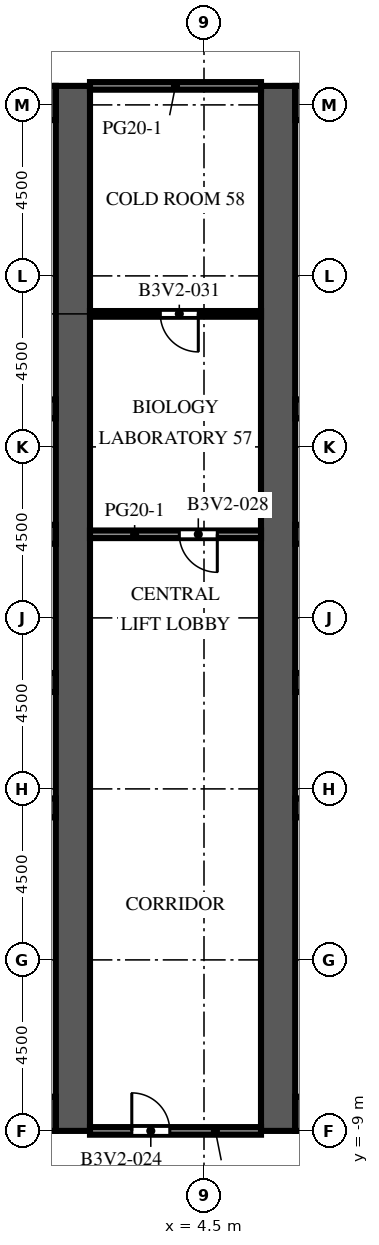
"""IFC4 building model, lengths in metres.
Left out: names, types, materials, properties, quantities, classifications, styles, units other than length and angle.
Written with IfcOpenShell. Run it as: python <this file> out.ifc"""

import sys

from ifc_helpers import new_model, si_unit, direction, frame, frame_2d, origin, place, context, subcontext, project, spatial, rectangle, extrude, element, fill, save


model = new_model("IFC4")
c1 = context("Model", 3, precision=1e-05, world=origin(), true_north=direction((0.0, 1.0)))
c2 = subcontext(c1, "Body", "Model", "MODEL_VIEW")
j1 = project(units=[si_unit("LENGTHUNIT", "METRE"), si_unit("PLANEANGLEUNIT", "RADIAN")], contexts=[c1])
p1 = place(None, origin())
s1 = spatial("IfcSite", under=j1, at=p1, CompositionType="ELEMENT")
p2 = place(p1, origin())
s2 = spatial("IfcBuilding", under=s1, at=p2, CompositionType="ELEMENT")
p3 = place(p2, frame((0.0, 0.0, 98.4)))
s3 = spatial("IfcBuildingStorey", under=s2, at=p3, CompositionType="ELEMENT", Elevation=98.4)
p4 = place(p3, frame((1.05, -9.0, 0.0), z_axis=(0.0, 0.0, 1.0), x_axis=(0.0, 1.0, 0.0)))
e1 = element("IfcWall", 1, at=p4, inside=s3, PredefinedType="SHEAR", context=c2, shape_type="SweptSolid", body=[
    extrude(rectangle(XDim=27.5, YDim=0.9, at=frame_2d((13.75, 0.0))), origin(), (0.0, 0.0, 1.0), 4.1),
])
p5 = place(p4, frame((12.55, 0.0, 0.0)))
e2 = element("IfcOpeningElement", 2, at=p5, cuts=e1, PredefinedType="OPENING", context=c2, shape_type="SweptSolid", body=[
    extrude(rectangle(XDim=2.4, YDim=2.4, at=frame_2d((1.2, 1.2))), frame((0.0, 0.46, 0.0), z_axis=(0.0, -1.0, 0.0), x_axis=(1.0, 0.0, 0.0)), (0.0, 0.0, 1.0), 0.92),
])
p6 = place(p4, frame((3.893, 0.0, 0.0)))
e3 = element("IfcOpeningElement", 3, at=p6, cuts=e1, PredefinedType="OPENING", context=c2, shape_type="SweptSolid", body=[
    extrude(rectangle(XDim=0.923, YDim=2.1, at=frame_2d((0.461, 1.05))), frame((0.0, 0.46, 0.0), z_axis=(0.0, -1.0, 0.0), x_axis=(1.0, 0.0, 0.0)), (0.0, 0.0, 1.0), 0.92),
])
p7 = place(p4, frame((23.427, 0.0, 0.0)))
e4 = element("IfcOpeningElement", 4, at=p7, cuts=e1, PredefinedType="OPENING", context=c2, shape_type="SweptSolid", body=[
    extrude(rectangle(XDim=1.2, YDim=2.1, at=frame_2d((0.6, 1.05))), frame((0.0, 0.46, 0.0), z_axis=(0.0, -1.0, 0.0), x_axis=(1.0, 0.0, 0.0)), (0.0, 0.0, 1.0), 0.92),
])
for number, where, z_axis, x_axis in (
    (5, (-9.6, -8.55, 0.0), (0.0, 0.0, 1.0), (1.0, 0.0, 0.0)),
    (6, (-9.6, 18.05, 0.0), (0.0, 0.0, 1.0), (1.0, 0.0, 0.0)),
):
    element("IfcWall", number, at=place(p3, frame(where, z_axis=z_axis, x_axis=x_axis)), inside=s3, PredefinedType="SHEAR", context=c2, shape_type="SweptSolid", body=[
        extrude(rectangle(XDim=10.2, YDim=0.9, at=frame_2d((5.1, 0.0))), origin(), (0.0, 0.0, 1.0), 4.1),
    ])
p8 = place(p3, frame((-9.6, -0.5, 0.0), z_axis=(0.0, 0.0, 1.0), x_axis=(1.0, 0.0, 0.0)))
e7 = element("IfcWall", 7, at=p8, inside=s3, PredefinedType="SHEAR", context=c2, shape_type="SweptSolid", body=[
    extrude(rectangle(XDim=10.2, YDim=0.5, at=frame_2d((5.1, 0.0))), origin(), (0.0, 0.0, 1.0), 4.1),
])
p9 = place(p3, frame((-9.6, 2.8, 0.0), z_axis=(0.0, 0.0, 1.0), x_axis=(1.0, 0.0, 0.0)))
e8 = element("IfcWall", 8, at=p9, inside=s3, PredefinedType="SHEAR", context=c2, shape_type="SweptSolid", body=[
    extrude(rectangle(XDim=10.2, YDim=0.5, at=frame_2d((5.1, 0.0))), origin(), (0.0, 0.0, 1.0), 4.1),
])
p10 = place(p9, frame((0.562, 0.0, 0.0)))
e9 = element("IfcOpeningElement", 9, at=p10, cuts=e8, PredefinedType="OPENING", context=c2, shape_type="SweptSolid", body=[
    extrude(rectangle(XDim=1.1, YDim=2.1, at=frame_2d((0.55, 1.05))), frame((0.0, 0.26, 0.0), z_axis=(0.0, -1.0, 0.0), x_axis=(1.0, 0.0, 0.0)), (0.0, 0.0, 1.0), 0.52),
])
p11 = place(p9, frame((3.238, 0.0, 0.0)))
e10 = element("IfcOpeningElement", 10, at=p11, cuts=e8, PredefinedType="OPENING", context=c2, shape_type="SweptSolid", body=[
    extrude(rectangle(XDim=1.1, YDim=2.1, at=frame_2d((0.55, 1.05))), frame((0.0, 0.26, 0.0), z_axis=(0.0, -1.0, 0.0), x_axis=(1.0, 0.0, 0.0)), (0.0, 0.0, 1.0), 0.52),
])
p12 = place(p9, frame((8.538, 0.0, 0.0)))
e11 = element("IfcOpeningElement", 11, at=p12, cuts=e8, PredefinedType="OPENING", context=c2, shape_type="SweptSolid", body=[
    extrude(rectangle(XDim=1.1, YDim=2.1, at=frame_2d((0.55, 1.05))), frame((0.0, 0.26, 0.0), z_axis=(0.0, -1.0, 0.0), x_axis=(1.0, 0.0, 0.0)), (0.0, 0.0, 1.0), 0.52),
])
p13 = place(p3, frame((-9.6, 6.7, 0.0), z_axis=(0.0, 0.0, 1.0), x_axis=(1.0, 0.0, 0.0)))
e12 = element("IfcWall", 12, at=p13, inside=s3, PredefinedType="SHEAR", context=c2, shape_type="SweptSolid", body=[
    extrude(rectangle(XDim=10.2, YDim=0.5, at=frame_2d((5.1, 0.0))), origin(), (0.0, 0.0, 1.0), 4.1),
])
p14 = place(p13, frame((0.562, 0.0, 0.0)))
e13 = element("IfcOpeningElement", 13, at=p14, cuts=e12, PredefinedType="OPENING", context=c2, shape_type="SweptSolid", body=[
    extrude(rectangle(XDim=1.1, YDim=2.1, at=frame_2d((0.55, 1.05))), frame((0.0, 0.26, 0.0), z_axis=(0.0, -1.0, 0.0), x_axis=(1.0, 0.0, 0.0)), (0.0, 0.0, 1.0), 0.52),
])
p15 = place(p13, frame((3.288, 0.0, 0.0)))
e14 = element("IfcOpeningElement", 14, at=p15, cuts=e12, PredefinedType="OPENING", context=c2, shape_type="SweptSolid", body=[
    extrude(rectangle(XDim=1.0, YDim=2.1, at=frame_2d((0.5, 1.05))), frame((0.0, 0.26, 0.0), z_axis=(0.0, -1.0, 0.0), x_axis=(1.0, 0.0, 0.0)), (0.0, 0.0, 1.0), 0.52),
])
p16 = place(p13, frame((5.913, 0.0, 0.0)))
e15 = element("IfcOpeningElement", 15, at=p16, cuts=e12, PredefinedType="OPENING", context=c2, shape_type="SweptSolid", body=[
    extrude(rectangle(XDim=1.0, YDim=2.1, at=frame_2d((0.5, 1.05))), frame((0.0, 0.26, 0.0), z_axis=(0.0, -1.0, 0.0), x_axis=(1.0, 0.0, 0.0)), (0.0, 0.0, 1.0), 0.52),
])
p17 = place(p13, frame((8.587, 0.0, 0.0)))
e16 = element("IfcOpeningElement", 16, at=p17, cuts=e12, PredefinedType="OPENING", context=c2, shape_type="SweptSolid", body=[
    extrude(rectangle(XDim=1.0, YDim=2.1, at=frame_2d((0.5, 1.05))), frame((0.0, 0.26, 0.0), z_axis=(0.0, -1.0, 0.0), x_axis=(1.0, 0.0, 0.0)), (0.0, 0.0, 1.0), 0.52),
])
p18 = place(p3, frame((-9.6, 10.0, 0.0), z_axis=(0.0, 0.0, 1.0), x_axis=(1.0, 0.0, 0.0)))
e17 = element("IfcWall", 17, at=p18, inside=s3, PredefinedType="SHEAR", context=c2, shape_type="SweptSolid", body=[
    extrude(rectangle(XDim=10.2, YDim=0.5, at=frame_2d((5.1, 0.0))), origin(), (0.0, 0.0, 1.0), 4.1),
])
p19 = place(p3, frame((6.45, -9.0, 0.0), z_axis=(0.0, 0.0, 1.0), x_axis=(0.0, 1.0, 0.0)))
e18 = element("IfcWall", 18, at=p19, inside=s3, PredefinedType="SHEAR", context=c2, shape_type="SweptSolid", body=[
    extrude(rectangle(XDim=27.5, YDim=0.9, at=frame_2d((13.75, 0.0))), origin(), (0.0, 0.0, 1.0), 4.1),
])
p20 = place(p19, frame((12.55, 0.0, 0.0)))
e19 = element("IfcOpeningElement", 19, at=p20, cuts=e18, PredefinedType="OPENING", context=c2, shape_type="SweptSolid", body=[
    extrude(rectangle(XDim=2.4, YDim=2.4, at=frame_2d((1.2, 1.2))), frame((0.0, 0.46, 0.0), z_axis=(0.0, -1.0, 0.0), x_axis=(1.0, 0.0, 0.0)), (0.0, 0.0, 1.0), 0.92),
])
p21 = place(p19, frame((3.893, 0.0, 0.0)))
e20 = element("IfcOpeningElement", 20, at=p21, cuts=e18, PredefinedType="OPENING", context=c2, shape_type="SweptSolid", body=[
    extrude(rectangle(XDim=0.923, YDim=2.1, at=frame_2d((0.461, 1.05))), frame((0.0, 0.46, 0.0), z_axis=(0.0, -1.0, 0.0), x_axis=(1.0, 0.0, 0.0)), (0.0, 0.0, 1.0), 0.92),
])
p22 = place(p19, frame((23.427, 0.0, 0.0)))
e21 = element("IfcOpeningElement", 21, at=p22, cuts=e18, PredefinedType="OPENING", context=c2, shape_type="SweptSolid", body=[
    extrude(rectangle(XDim=1.2, YDim=2.1, at=frame_2d((0.6, 1.05))), frame((0.0, 0.46, 0.0), z_axis=(0.0, -1.0, 0.0), x_axis=(1.0, 0.0, 0.0)), (0.0, 0.0, 1.0), 0.92),
])
for number, where, z_axis, x_axis in (
    (22, (6.9, -8.55, 0.0), (0.0, 0.0, 1.0), (1.0, 0.0, 0.0)),
    (23, (6.9, 18.05, 0.0), (0.0, 0.0, 1.0), (1.0, 0.0, 0.0)),
):
    element("IfcWall", number, at=place(p3, frame(where, z_axis=z_axis, x_axis=x_axis)), inside=s3, PredefinedType="SHEAR", context=c2, shape_type="SweptSolid", body=[
        extrude(rectangle(XDim=10.2, YDim=0.9, at=frame_2d((5.1, 0.0))), origin(), (0.0, 0.0, 1.0), 4.1),
    ])
p23 = place(p3, frame((6.9, -0.5, 0.0), z_axis=(0.0, 0.0, 1.0), x_axis=(1.0, 0.0, 0.0)))
e24 = element("IfcWall", 24, at=p23, inside=s3, PredefinedType="SHEAR", context=c2, shape_type="SweptSolid", body=[
    extrude(rectangle(XDim=10.2, YDim=0.5, at=frame_2d((5.1, 0.0))), origin(), (0.0, 0.0, 1.0), 4.1),
])
p24 = place(p3, frame((6.9, 2.8, 0.0), z_axis=(0.0, 0.0, 1.0), x_axis=(1.0, 0.0, 0.0)))
e25 = element("IfcWall", 25, at=p24, inside=s3, PredefinedType="SHEAR", context=c2, shape_type="SweptSolid", body=[
    extrude(rectangle(XDim=10.2, YDim=0.5, at=frame_2d((5.1, 0.0))), origin(), (0.0, 0.0, 1.0), 4.1),
])
p25 = place(p24, frame((0.562, 0.0, 0.0)))
e26 = element("IfcOpeningElement", 26, at=p25, cuts=e25, PredefinedType="OPENING", context=c2, shape_type="SweptSolid", body=[
    extrude(rectangle(XDim=1.1, YDim=2.1, at=frame_2d((0.55, 1.05))), frame((0.0, 0.26, 0.0), z_axis=(0.0, -1.0, 0.0), x_axis=(1.0, 0.0, 0.0)), (0.0, 0.0, 1.0), 0.52),
])
p26 = place(p24, frame((3.238, 0.0, 0.0)))
e27 = element("IfcOpeningElement", 27, at=p26, cuts=e25, PredefinedType="OPENING", context=c2, shape_type="SweptSolid", body=[
    extrude(rectangle(XDim=1.1, YDim=2.1, at=frame_2d((0.55, 1.05))), frame((0.0, 0.26, 0.0), z_axis=(0.0, -1.0, 0.0), x_axis=(1.0, 0.0, 0.0)), (0.0, 0.0, 1.0), 0.52),
])
p27 = place(p24, frame((8.538, 0.0, 0.0)))
e28 = element("IfcOpeningElement", 28, at=p27, cuts=e25, PredefinedType="OPENING", context=c2, shape_type="SweptSolid", body=[
    extrude(rectangle(XDim=1.1, YDim=2.1, at=frame_2d((0.55, 1.05))), frame((0.0, 0.26, 0.0), z_axis=(0.0, -1.0, 0.0), x_axis=(1.0, 0.0, 0.0)), (0.0, 0.0, 1.0), 0.52),
])
p28 = place(p3, frame((6.9, 6.7, 0.0), z_axis=(0.0, 0.0, 1.0), x_axis=(1.0, 0.0, 0.0)))
e29 = element("IfcWall", 29, at=p28, inside=s3, PredefinedType="SHEAR", context=c2, shape_type="SweptSolid", body=[
    extrude(rectangle(XDim=10.2, YDim=0.5, at=frame_2d((5.1, 0.0))), origin(), (0.0, 0.0, 1.0), 4.1),
])
p29 = place(p28, frame((0.562, 0.0, 0.0)))
e30 = element("IfcOpeningElement", 30, at=p29, cuts=e29, PredefinedType="OPENING", context=c2, shape_type="SweptSolid", body=[
    extrude(rectangle(XDim=1.1, YDim=2.1, at=frame_2d((0.55, 1.05))), frame((0.0, 0.26, 0.0), z_axis=(0.0, -1.0, 0.0), x_axis=(1.0, 0.0, 0.0)), (0.0, 0.0, 1.0), 0.52),
])
p30 = place(p28, frame((3.288, 0.0, 0.0)))
e31 = element("IfcOpeningElement", 31, at=p30, cuts=e29, PredefinedType="OPENING", context=c2, shape_type="SweptSolid", body=[
    extrude(rectangle(XDim=1.0, YDim=2.1, at=frame_2d((0.5, 1.05))), frame((0.0, 0.26, 0.0), z_axis=(0.0, -1.0, 0.0), x_axis=(1.0, 0.0, 0.0)), (0.0, 0.0, 1.0), 0.52),
])
p31 = place(p28, frame((5.913, 0.0, 0.0)))
e32 = element("IfcOpeningElement", 32, at=p31, cuts=e29, PredefinedType="OPENING", context=c2, shape_type="SweptSolid", body=[
    extrude(rectangle(XDim=1.0, YDim=2.1, at=frame_2d((0.5, 1.05))), frame((0.0, 0.26, 0.0), z_axis=(0.0, -1.0, 0.0), x_axis=(1.0, 0.0, 0.0)), (0.0, 0.0, 1.0), 0.52),
])
p32 = place(p28, frame((8.587, 0.0, 0.0)))
e33 = element("IfcOpeningElement", 33, at=p32, cuts=e29, PredefinedType="OPENING", context=c2, shape_type="SweptSolid", body=[
    extrude(rectangle(XDim=1.0, YDim=2.1, at=frame_2d((0.5, 1.05))), frame((0.0, 0.26, 0.0), z_axis=(0.0, -1.0, 0.0), x_axis=(1.0, 0.0, 0.0)), (0.0, 0.0, 1.0), 0.52),
])
p33 = place(p3, frame((6.9, 10.0, 0.0), z_axis=(0.0, 0.0, 1.0), x_axis=(1.0, 0.0, 0.0)))
e34 = element("IfcWall", 34, at=p33, inside=s3, PredefinedType="SHEAR", context=c2, shape_type="SweptSolid", body=[
    extrude(rectangle(XDim=10.2, YDim=0.5, at=frame_2d((5.1, 0.0))), origin(), (0.0, 0.0, 1.0), 4.1),
])
p34 = place(p3, frame((-4.25, -5.307, 0.0), z_axis=(0.0, 0.0, 1.0), x_axis=(1.0, 0.0, 0.0)))
e35 = element("IfcWall", 35, at=p34, inside=s3, PredefinedType="PARTITIONING", context=c2, shape_type="SweptSolid", body=[
    extrude(rectangle(XDim=4.85, YDim=0.1, at=frame_2d((2.425, 0.0))), origin(), (0.0, 0.0, 1.0), 3.65),
])
p35 = place(p34, frame((1.925, 0.0, 0.0)))
e36 = element("IfcOpeningElement", 36, at=p35, cuts=e35, PredefinedType="OPENING", context=c2, shape_type="SweptSolid", body=[
    extrude(rectangle(XDim=1.0, YDim=2.1, at=frame_2d((0.5, 1.05))), frame((0.0, 0.06, 0.0), z_axis=(0.0, -1.0, 0.0), x_axis=(1.0, 0.0, 0.0)), (0.0, 0.0, 1.0), 0.12),
])
p36 = place(p3, frame((-2.407, -3.984, 0.0), z_axis=(0.0, 0.0, 1.0), x_axis=(1.0, 0.0, 0.0)))
e37 = element("IfcWall", 37, at=p36, inside=s3, PredefinedType="PARTITIONING", context=c2, shape_type="SweptSolid", body=[
    extrude(rectangle(XDim=3.007, YDim=0.1, at=frame_2d((1.503, 0.0))), origin(), (0.0, 0.0, 1.0), 3.65),
])
p37 = place(p36, frame((1.003, 0.0, 0.0)))
e38 = element("IfcOpeningElement", 38, at=p37, cuts=e37, PredefinedType="OPENING", context=c2, shape_type="SweptSolid", body=[
    extrude(rectangle(XDim=1.0, YDim=2.1, at=frame_2d((0.5, 1.05))), frame((0.0, 0.06, 0.0), z_axis=(0.0, -1.0, 0.0), x_axis=(1.0, 0.0, 0.0)), (0.0, 0.0, 1.0), 0.12),
])
p38 = place(p3, frame((-0.7, 12.455, 0.0), z_axis=(0.0, 0.0, 1.0), x_axis=(1.0, 0.0, 0.0)))
e39 = element("IfcWall", 39, at=p38, inside=s3, PredefinedType="PARTITIONING", context=c2, shape_type="SweptSolid", body=[
    extrude(rectangle(XDim=1.3, YDim=0.1, at=frame_2d((0.65, 0.0))), origin(), (0.0, 0.0, 1.0), 3.65),
])
p39 = place(p38, frame((0.2, 0.0, 0.0)))
e40 = element("IfcOpeningElement", 40, at=p39, cuts=e39, PredefinedType="OPENING", context=c2, shape_type="SweptSolid", body=[
    extrude(rectangle(XDim=0.9, YDim=2.1, at=frame_2d((0.45, 1.05))), frame((0.0, 0.06, 0.0), z_axis=(0.0, -1.0, 0.0), x_axis=(1.0, 0.0, 0.0)), (0.0, 0.0, 1.0), 0.12),
])
p40 = place(p3, frame((6.9, -5.307, 0.0), z_axis=(0.0, 0.0, 1.0), x_axis=(1.0, 0.0, 0.0)))
e41 = element("IfcWall", 41, at=p40, inside=s3, PredefinedType="PARTITIONING", context=c2, shape_type="SweptSolid", body=[
    extrude(rectangle(XDim=4.85, YDim=0.1, at=frame_2d((2.425, 0.0))), origin(), (0.0, 0.0, 1.0), 3.65),
])
p41 = place(p40, frame((1.925, 0.0, 0.0)))
e42 = element("IfcOpeningElement", 42, at=p41, cuts=e41, PredefinedType="OPENING", context=c2, shape_type="SweptSolid", body=[
    extrude(rectangle(XDim=1.0, YDim=2.1, at=frame_2d((0.5, 1.05))), frame((0.0, 0.06, 0.0), z_axis=(0.0, -1.0, 0.0), x_axis=(1.0, 0.0, 0.0)), (0.0, 0.0, 1.0), 0.12),
])
p42 = place(p3, frame((6.9, -3.984, 0.0), z_axis=(0.0, 0.0, 1.0), x_axis=(1.0, 0.0, 0.0)))
e43 = element("IfcWall", 43, at=p42, inside=s3, PredefinedType="PARTITIONING", context=c2, shape_type="SweptSolid", body=[
    extrude(rectangle(XDim=3.007, YDim=0.1, at=frame_2d((1.503, 0.0))), origin(), (0.0, 0.0, 1.0), 3.65),
])
p43 = place(p42, frame((1.003, 0.0, 0.0)))
e44 = element("IfcOpeningElement", 44, at=p43, cuts=e43, PredefinedType="OPENING", context=c2, shape_type="SweptSolid", body=[
    extrude(rectangle(XDim=1.0, YDim=2.1, at=frame_2d((0.5, 1.05))), frame((0.0, 0.06, 0.0), z_axis=(0.0, -1.0, 0.0), x_axis=(1.0, 0.0, 0.0)), (0.0, 0.0, 1.0), 0.12),
])
p44 = place(p3, frame((6.9, 12.455, 0.0), z_axis=(0.0, 0.0, 1.0), x_axis=(1.0, 0.0, 0.0)))
e45 = element("IfcWall", 45, at=p44, inside=s3, PredefinedType="PARTITIONING", context=c2, shape_type="SweptSolid", body=[
    extrude(rectangle(XDim=1.3, YDim=0.1, at=frame_2d((0.65, 0.0))), origin(), (0.0, 0.0, 1.0), 3.65),
])
p45 = place(p44, frame((0.2, 0.0, 0.0)))
e46 = element("IfcOpeningElement", 46, at=p45, cuts=e45, PredefinedType="OPENING", context=c2, shape_type="SweptSolid", body=[
    extrude(rectangle(XDim=0.9, YDim=2.1, at=frame_2d((0.45, 1.05))), frame((0.0, 0.06, 0.0), z_axis=(0.0, -1.0, 0.0), x_axis=(1.0, 0.0, 0.0)), (0.0, 0.0, 1.0), 0.12),
])
p46 = place(p3, frame((6.0, -9.0, 0.0), z_axis=(0.0, 0.0, 1.0), x_axis=(-1.0, 0.0, 0.0)))
e47 = element("IfcWall", 47, at=p46, inside=s3, PredefinedType="PARTITIONING", context=c2, shape_type="SweptSolid", body=[
    extrude(rectangle(XDim=4.5, YDim=0.2, at=frame_2d((2.25, 0.0))), origin(), (0.0, 0.0, 1.0), 3.65),
])
p47 = place(p46, frame((2.4, 0.0, 0.0)))
e48 = element("IfcOpeningElement", 48, at=p47, cuts=e47, PredefinedType="OPENING", context=c2, shape_type="SweptSolid", body=[
    extrude(rectangle(XDim=1.0, YDim=2.1, at=frame_2d((0.5, 1.05))), frame((0.0, 0.11, 0.0), z_axis=(0.0, -1.0, 0.0), x_axis=(1.0, 0.0, 0.0)), (0.0, 0.0, 1.0), 0.22),
])
p48 = place(p3, frame((1.5, 6.7, 0.0), z_axis=(0.0, 0.0, 1.0), x_axis=(1.0, 0.0, 0.0)))
e49 = element("IfcWall", 49, at=p48, inside=s3, PredefinedType="PARTITIONING", context=c2, shape_type="SweptSolid", body=[
    extrude(rectangle(XDim=4.5, YDim=0.2, at=frame_2d((2.25, 0.0))), origin(), (0.0, 0.0, 1.0), 3.65),
])
p49 = place(p48, frame((2.35, 0.0, 0.0)))
e50 = element("IfcOpeningElement", 50, at=p49, cuts=e49, PredefinedType="OPENING", context=c2, shape_type="SweptSolid", body=[
    extrude(rectangle(XDim=1.0, YDim=2.1, at=frame_2d((0.5, 1.05))), frame((0.0, 0.11, 0.0), z_axis=(0.0, -1.0, 0.0), x_axis=(1.0, 0.0, 0.0)), (0.0, 0.0, 1.0), 0.22),
])
p50 = place(p3, frame((1.5, 12.5, 0.0), z_axis=(0.0, 0.0, 1.0), x_axis=(1.0, 0.0, 0.0)))
e51 = element("IfcWall", 51, at=p50, inside=s3, PredefinedType="PARTITIONING", context=c2, shape_type="SweptSolid", body=[
    extrude(rectangle(XDim=4.5, YDim=0.15, at=frame_2d((2.25, 0.0))), origin(), (0.0, 0.0, 1.0), 3.65),
])
p51 = place(p50, frame((1.85, 0.0, 0.0)))
e52 = element("IfcOpeningElement", 52, at=p51, cuts=e51, PredefinedType="OPENING", context=c2, shape_type="SweptSolid", body=[
    extrude(rectangle(XDim=1.0, YDim=2.1, at=frame_2d((0.5, 1.05))), frame((0.0, 0.085, 0.0), z_axis=(0.0, -1.0, 0.0), x_axis=(1.0, 0.0, 0.0)), (0.0, 0.0, 1.0), 0.17),
])
p52 = place(p3, frame((1.5, 18.5, 0.0), z_axis=(0.0, 0.0, 1.0), x_axis=(1.0, 0.0, 0.0)))
e53 = element("IfcWall", 53, at=p52, inside=s3, PredefinedType="PARTITIONING", context=c2, shape_type="SweptSolid", body=[
    extrude(rectangle(XDim=4.5, YDim=0.2, at=frame_2d((2.25, 0.0))), origin(), (0.0, 0.0, 1.0), 3.65),
])
p53 = place(p5, origin())
e54 = element("IfcDoor", 54, at=p53, inside=s3, OperationType="DOUBLE_DOOR_DOUBLE_SWING", PredefinedType="DOOR", context=c2, shape_type="SweptSolid", body=[
    extrude(rectangle(XDim=2.4, YDim=2.4, at=frame_2d((1.2, 1.2))), frame((0.0, 0.025, 0.0), z_axis=(0.0, -1.0, 0.0), x_axis=(1.0, 0.0, 0.0)), (0.0, 0.0, 1.0), 0.05),
])
fill(e2, e54)
p54 = place(p20, origin())
e55 = element("IfcDoor", 55, at=p54, inside=s3, OperationType="DOUBLE_DOOR_DOUBLE_SWING", PredefinedType="DOOR", context=c2, shape_type="SweptSolid", body=[
    extrude(rectangle(XDim=2.4, YDim=2.4, at=frame_2d((1.2, 1.2))), frame((0.0, 0.025, 0.0), z_axis=(0.0, -1.0, 0.0), x_axis=(1.0, 0.0, 0.0)), (0.0, 0.0, 1.0), 0.05),
])
fill(e19, e55)
p55 = place(p6, origin())
e56 = element("IfcDoor", 56, at=p55, inside=s3, OperationType="SINGLE_SWING_LEFT", PredefinedType="DOOR", context=c2, shape_type="SweptSolid", body=[
    extrude(rectangle(XDim=0.923, YDim=2.1, at=frame_2d((0.461, 1.05))), frame((0.0, 0.425, 0.0), z_axis=(0.0, -1.0, 0.0), x_axis=(1.0, 0.0, 0.0)), (0.0, 0.0, 1.0), 0.05),
])
fill(e3, e56)
p56 = place(p7, origin())
e57 = element("IfcDoor", 57, at=p56, inside=s3, OperationType="SINGLE_SWING_RIGHT", PredefinedType="DOOR", context=c2, shape_type="SweptSolid", body=[
    extrude(rectangle(XDim=1.2, YDim=2.1, at=frame_2d((0.6, 1.05))), frame((0.0, 0.425, 0.0), z_axis=(0.0, -1.0, 0.0), x_axis=(1.0, 0.0, 0.0)), (0.0, 0.0, 1.0), 0.05),
])
fill(e4, e57)
p57 = place(p21, origin())
e58 = element("IfcDoor", 58, at=p57, inside=s3, OperationType="SINGLE_SWING_RIGHT", PredefinedType="DOOR", context=c2, shape_type="SweptSolid", body=[
    extrude(rectangle(XDim=0.923, YDim=2.1, at=frame_2d((0.461, 1.05))), frame((0.0, -0.375, 0.0), z_axis=(0.0, -1.0, 0.0), x_axis=(1.0, 0.0, 0.0)), (0.0, 0.0, 1.0), 0.05),
])
fill(e20, e58)
p58 = place(p22, origin())
e59 = element("IfcDoor", 59, at=p58, inside=s3, OperationType="SINGLE_SWING_LEFT", PredefinedType="DOOR", context=c2, shape_type="SweptSolid", body=[
    extrude(rectangle(XDim=1.2, YDim=2.1, at=frame_2d((0.6, 1.05))), frame((0.0, -0.375, 0.0), z_axis=(0.0, -1.0, 0.0), x_axis=(1.0, 0.0, 0.0)), (0.0, 0.0, 1.0), 0.05),
])
fill(e21, e59)
p59 = place(p47, origin())
e60 = element("IfcDoor", 60, at=p59, inside=s3, OperationType="SINGLE_SWING_RIGHT", PredefinedType="DOOR", context=c2, shape_type="SweptSolid", body=[
    extrude(rectangle(XDim=1.0, YDim=2.1, at=frame_2d((0.5, 1.05))), frame((0.0, 0.025, 0.0), z_axis=(0.0, -1.0, 0.0), x_axis=(1.0, 0.0, 0.0)), (0.0, 0.0, 1.0), 0.05),
])
fill(e48, e60)
p60 = place(p49, origin())
e61 = element("IfcDoor", 61, at=p60, inside=s3, OperationType="SINGLE_SWING_RIGHT", PredefinedType="DOOR", context=c2, shape_type="SweptSolid", body=[
    extrude(rectangle(XDim=1.0, YDim=2.1, at=frame_2d((0.5, 1.05))), frame((0.0, 0.025, 0.0), z_axis=(0.0, -1.0, 0.0), x_axis=(1.0, 0.0, 0.0)), (0.0, 0.0, 1.0), 0.05),
])
fill(e50, e61)
p61 = place(p51, origin())
e62 = element("IfcDoor", 62, at=p61, inside=s3, OperationType="SINGLE_SWING_RIGHT", PredefinedType="DOOR", context=c2, shape_type="SweptSolid", body=[
    extrude(rectangle(XDim=1.0, YDim=2.1, at=frame_2d((0.5, 1.05))), frame((0.0, 0.025, 0.0), z_axis=(0.0, -1.0, 0.0), x_axis=(1.0, 0.0, 0.0)), (0.0, 0.0, 1.0), 0.05),
])
fill(e52, e62)
save(model, sys.argv[1])
